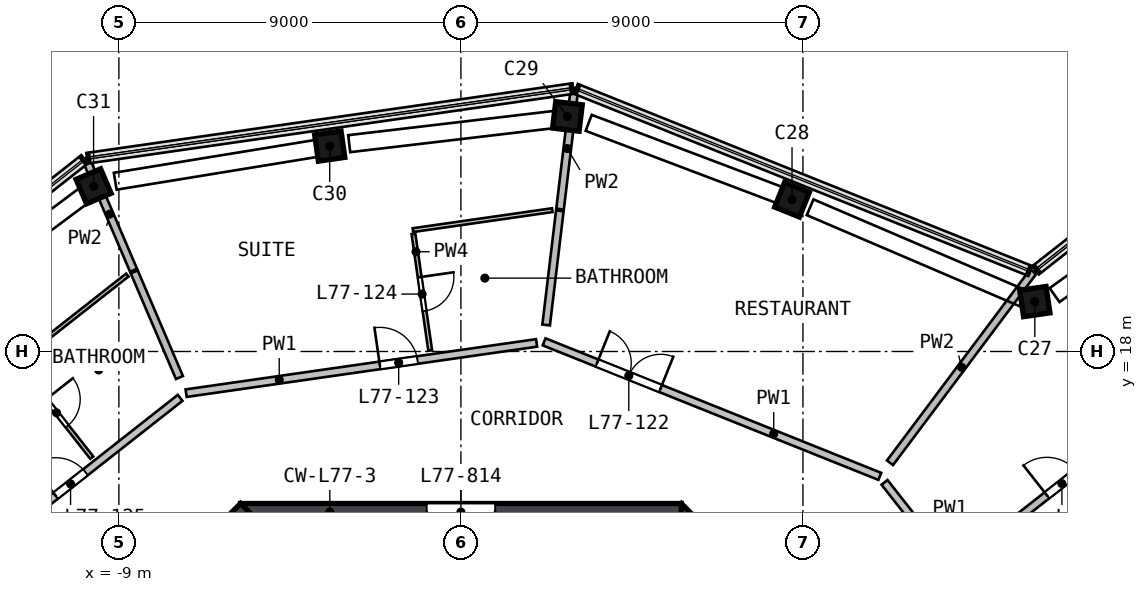
"""IFC4 building model, lengths in metres.
Left out: names, types, materials, properties, quantities, classifications, styles, units other than length and angle.
Written with IfcOpenShell. Run it as: python <this file> out.ifc"""

import sys

from ifc_helpers import new_model, si_unit, direction, frame, frame_2d, origin, origin_2d, place, context, subcontext, project, spatial, rectangle, extrude, element, fill, save


model = new_model("IFC4")
c1 = context("Model", 3, precision=1e-05, world=origin(), true_north=direction((0.0, 1.0)))
c2 = subcontext(c1, "Body", "Model", "MODEL_VIEW")
j1 = project(units=[si_unit("LENGTHUNIT", "METRE"), si_unit("PLANEANGLEUNIT", "RADIAN")], contexts=[c1])
p1 = place(None, origin())
s1 = spatial("IfcSite", under=j1, at=p1, CompositionType="ELEMENT")
p2 = place(p1, origin())
s2 = spatial("IfcBuilding", under=s1, at=p2, CompositionType="ELEMENT")
p3 = place(p2, frame((0.0, 0.0, 310.0)))
s3 = spatial("IfcBuildingStorey", under=s2, at=p3, CompositionType="ELEMENT", Elevation=310.0)
p4 = place(p3, frame((15.179, 19.253, 0.0), z_axis=(-0.064690399, 0.050144316, 0.996644721), x_axis=(0.987816207, 0.14487826, 0.056828077)))
e1 = element("IfcColumn", 1, at=p4, inside=s3, PredefinedType="COLUMN", context=c2, shape_type="SweptSolid", body=[
    extrude(rectangle(XDim=0.7, YDim=0.7, at=origin_2d()), origin(), (0.0, 0.0, 1.0), 4.615),
])
p5 = place(p3, frame((8.801, 21.96, 0.0), z_axis=(-0.07359358, 0.028781386, 0.996872919), x_axis=(-0.925306036, 0.370897286, -0.079018619)))
e2 = element("IfcColumn", 2, at=p5, inside=s3, PredefinedType="COLUMN", context=c2, shape_type="SweptSolid", body=[
    extrude(rectangle(XDim=0.7, YDim=0.7, at=origin_2d()), origin(), (0.0, 0.0, 1.0), 4.615),
])
p6 = place(p3, frame((2.9, 24.175, 0.0), z_axis=(-0.080826804, 0.008992511, 0.996687595), x_axis=(0.989611352, -0.118558007, 0.081322631)))
e3 = element("IfcColumn", 3, at=p6, inside=s3, PredefinedType="COLUMN", context=c2, shape_type="SweptSolid", body=[
    extrude(rectangle(XDim=0.7, YDim=0.7, at=origin_2d()), origin(), (0.0, 0.0, 1.0), 4.615),
])
p7 = place(p3, frame((-3.358, 23.419, 0.0), z_axis=(-0.078143481, -0.011851144, 0.99687168), x_axis=(-0.986826788, -0.141161179, -0.079034246)))
e4 = element("IfcColumn", 4, at=p7, inside=s3, PredefinedType="COLUMN", context=c2, shape_type="SweptSolid", body=[
    extrude(rectangle(XDim=0.7, YDim=0.7, at=origin_2d()), origin(), (0.0, 0.0, 1.0), 4.615),
])
p8 = place(p3, frame((-9.576, 22.386, 0.0), z_axis=(-0.074479333, -0.032584708, 0.996690055), x_axis=(0.916461693, 0.391777358, 0.08129248)))
e5 = element("IfcColumn", 5, at=p8, inside=s3, PredefinedType="COLUMN", context=c2, shape_type="SweptSolid", body=[
    extrude(rectangle(XDim=0.7, YDim=0.7, at=origin_2d()), origin(), (0.0, 0.0, 1.0), 4.615),
])
p9 = place(p3, frame((13.841, 5.64, 0.0), z_axis=(0.0, 0.0, 1.0), x_axis=(-0.707106781, 0.707106781, 0.0)))
e6 = element("IfcWall", 6, at=p9, inside=s3, PredefinedType="SHEAR", context=c2, shape_type="SweptSolid", body=[
    extrude(rectangle(XDim=11.598, YDim=0.45, at=frame_2d((5.799, 0.0))), origin(), (0.0, 0.0, 1.0), 5.0),
])
p10 = place(p9, frame((2.099, 0.0, 0.0)))
e7 = element("IfcOpeningElement", 7, at=p10, cuts=e6, PredefinedType="OPENING", context=c2, shape_type="SweptSolid", body=[
    extrude(rectangle(XDim=1.2, YDim=2.1, at=frame_2d((0.6, 1.05))), frame((0.0, 0.235, 0.0), z_axis=(0.0, -1.0, 0.0), x_axis=(1.0, 0.0, 0.0)), (0.0, 0.0, 1.0), 0.47),
])
p11 = place(p3, frame((5.799, 13.775, 0.0), z_axis=(0.0, 0.0, 1.0), x_axis=(-1.0, 0.0, 0.0)))
e8 = element("IfcWall", 8, at=p11, inside=s3, PredefinedType="SHEAR", context=c2, shape_type="SweptSolid", body=[
    extrude(rectangle(XDim=11.598, YDim=0.45, at=frame_2d((5.799, 0.0))), origin(), (0.0, 0.0, 1.0), 5.0),
])
p12 = place(p11, frame((4.899, 0.0, 0.0)))
e9 = element("IfcOpeningElement", 9, at=p12, cuts=e8, PredefinedType="OPENING", context=c2, shape_type="SweptSolid", body=[
    extrude(rectangle(XDim=1.8, YDim=2.1, at=frame_2d((0.9, 1.05))), frame((0.0, 0.235, 0.0), z_axis=(0.0, -1.0, 0.0), x_axis=(1.0, 0.0, 0.0)), (0.0, 0.0, 1.0), 0.47),
])
p13 = place(p3, frame((-5.64, 13.841, 0.0), z_axis=(0.0, 0.0, 1.0), x_axis=(-0.707106781, -0.707106781, 0.0)))
e10 = element("IfcWall", 10, at=p13, inside=s3, PredefinedType="SHEAR", context=c2, shape_type="SweptSolid", body=[
    extrude(rectangle(XDim=11.598, YDim=0.45, at=frame_2d((5.799, 0.0))), origin(), (0.0, 0.0, 1.0), 5.0),
])
p14 = place(p3, frame((-14.713, 11.023, 0.0), z_axis=(0.0, 0.0, 1.0), x_axis=(0.786284693, 0.617864372, 0.0)))
e11 = element("IfcWall", 11, at=p14, inside=s3, PredefinedType="SOLIDWALL", context=c2, shape_type="SweptSolid", body=[
    extrude(rectangle(XDim=9.316, YDim=0.2, at=frame_2d((4.658, 0.0))), origin(), (0.0, 0.0, 1.0), 4.6),
])
p15 = place(p14, frame((5.15, 0.0, 0.0)))
e12 = element("IfcOpeningElement", 12, at=p15, cuts=e11, PredefinedType="OPENING", context=c2, shape_type="SweptSolid", body=[
    extrude(rectangle(XDim=1.0, YDim=2.1, at=frame_2d((0.5, 1.05))), frame((0.0, 0.11, 0.0), z_axis=(0.0, -1.0, 0.0), x_axis=(1.0, 0.0, 0.0)), (0.0, 0.0, 1.0), 0.22),
])
p16 = place(p3, frame((-7.231, 16.903, 0.0), z_axis=(0.0, 0.0, 1.0), x_axis=(0.989877038, 0.141927623, 0.0)))
e13 = element("IfcWall", 13, at=p16, inside=s3, PredefinedType="SOLIDWALL", context=c2, shape_type="SweptSolid", body=[
    extrude(rectangle(XDim=9.316, YDim=0.2, at=frame_2d((4.658, 0.0))), origin(), (0.0, 0.0, 1.0), 4.6),
])
p17 = place(p16, frame((5.15, 0.0, 0.0)))
e14 = element("IfcOpeningElement", 14, at=p17, cuts=e13, PredefinedType="OPENING", context=c2, shape_type="SweptSolid", body=[
    extrude(rectangle(XDim=1.0, YDim=2.1, at=frame_2d((0.5, 1.05))), frame((0.0, 0.11, 0.0), z_axis=(0.0, -1.0, 0.0), x_axis=(1.0, 0.0, 0.0)), (0.0, 0.0, 1.0), 0.22),
])
p18 = place(p3, frame((2.19, 18.254, 0.0), z_axis=(0.0, 0.0, 1.0), x_axis=(0.928227015, -0.37201426, 0.0)))
e15 = element("IfcWall", 15, at=p18, inside=s3, PredefinedType="SOLIDWALL", context=c2, shape_type="SweptSolid", body=[
    extrude(rectangle(XDim=9.517, YDim=0.2, at=frame_2d((4.758, 0.0))), origin(), (0.0, 0.0, 1.0), 4.6),
])
p19 = place(p18, frame((1.5, 0.0, 0.0)))
e16 = element("IfcOpeningElement", 16, at=p19, cuts=e15, PredefinedType="OPENING", context=c2, shape_type="SweptSolid", body=[
    extrude(rectangle(XDim=1.8, YDim=2.1, at=frame_2d((0.9, 1.05))), frame((0.0, 0.11, 0.0), z_axis=(0.0, -1.0, 0.0), x_axis=(1.0, 0.0, 0.0)), (0.0, 0.0, 1.0), 0.22),
])
p20 = place(p3, frame((11.147, 14.556, 0.0), z_axis=(0.0, 0.0, 1.0), x_axis=(0.617852301, -0.786294178, 0.0)))
e17 = element("IfcWall", 17, at=p20, inside=s3, PredefinedType="SOLIDWALL", context=c2, shape_type="SweptSolid", body=[
    extrude(rectangle(XDim=9.117, YDim=0.2, at=frame_2d((4.558, 0.0))), origin(), (0.0, 0.0, 1.0), 4.6),
])
p21 = place(p20, frame((3.659, 0.0, 0.0)))
e18 = element("IfcOpeningElement", 18, at=p21, cuts=e17, PredefinedType="OPENING", context=c2, shape_type="SweptSolid", body=[
    extrude(rectangle(XDim=1.8, YDim=2.1, at=frame_2d((0.9, 1.05))), frame((0.0, 0.11, 0.0), z_axis=(0.0, -1.0, 0.0), x_axis=(1.0, 0.0, 0.0)), (0.0, 0.0, 1.0), 0.22),
])
p22 = place(p3, frame((-8.614, 20.137, 0.0), z_axis=(0.0, 0.0, 1.0), x_axis=(-0.39326776, 0.919423988, 0.0)))
e19 = element("IfcWall", 19, at=p22, inside=s3, PredefinedType="SOLIDWALL", context=c2, shape_type="SweptSolid", body=[
    extrude(rectangle(XDim=3.211, YDim=0.2, at=frame_2d((1.606, 0.0))), origin(), (0.0, 0.0, 1.0), 4.6),
])
for number, where, z_axis, x_axis in (
    (20, (-7.406, 17.314, 0.0), (0.0, 0.0, 1.0), (-0.393, 0.919, 0.0)),
    (21, (2.243, 18.698, 0.0), (0.0, 0.0, 1.0), (0.119, 0.993, 0.0)),
):
    element("IfcWall", number, at=place(p3, frame(where, z_axis=z_axis, x_axis=x_axis)), inside=s3, PredefinedType="SOLIDWALL", context=c2, shape_type="SweptSolid", body=[
        extrude(rectangle(XDim=3.025, YDim=0.2, at=frame_2d((1.512, 0.0))), origin(), (0.0, 0.0, 1.0), 4.6),
    ])
p23 = place(p3, frame((2.608, 21.747, 0.0), z_axis=(0.0, 0.0, 1.0), x_axis=(0.119130232, 0.992878637, 0.0)))
e22 = element("IfcWall", 22, at=p23, inside=s3, PredefinedType="SOLIDWALL", context=c2, shape_type="SweptSolid", body=[
    extrude(rectangle(XDim=3.211, YDim=0.2, at=frame_2d((1.606, 0.0))), origin(), (0.0, 0.0, 1.0), 4.6),
])
p24 = place(p3, frame((11.291, 15.072, 0.0), z_axis=(0.0, 0.0, 1.0), x_axis=(0.599608195, 0.800293704, 0.0)))
e23 = element("IfcWall", 23, at=p24, inside=s3, PredefinedType="SOLIDWALL", context=c2, shape_type="SweptSolid", body=[
    extrude(rectangle(XDim=6.282, YDim=0.2, at=frame_2d((3.141, 0.0))), origin(), (0.0, 0.0, 1.0), 4.6),
])
p25 = place(p3, frame((13.102, 12.392, 0.0), z_axis=(0.0, 0.0, 1.0), x_axis=(0.786280326, 0.617869929, 0.0)))
e24 = element("IfcWall", 24, at=p25, inside=s3, PredefinedType="SOLIDWALL", context=c2, shape_type="SweptSolid", body=[
    extrude(rectangle(XDim=10.252, YDim=0.2, at=frame_2d((5.126, 0.0))), origin(), (0.0, 0.0, 1.0), 4.6),
])
p26 = place(p25, frame((2.95, 0.0, 0.0)))
e25 = element("IfcOpeningElement", 25, at=p26, cuts=e24, PredefinedType="OPENING", context=c2, shape_type="SweptSolid", body=[
    extrude(rectangle(XDim=1.0, YDim=2.1, at=frame_2d((0.5, 1.05))), frame((0.0, 0.11, 0.0), z_axis=(0.0, -1.0, 0.0), x_axis=(1.0, 0.0, 0.0)), (0.0, 0.0, 1.0), 0.22),
])
p27 = place(p3, frame((23.227, 16.1, 0.0), z_axis=(0.0, 0.0, 1.0), x_axis=(-0.786291895, -0.617855207, 0.0)))
e26 = element("IfcWall", 26, at=p27, inside=s3, PredefinedType="SOLIDWALL", context=c2, shape_type="SweptSolid", body=[
    extrude(rectangle(XDim=10.252, YDim=0.2, at=frame_2d((5.126, 0.0))), origin(), (0.0, 0.0, 1.0), 4.6),
])
p28 = place(p27, frame((2.45, 0.0, 0.0)))
e27 = element("IfcOpeningElement", 27, at=p28, cuts=e26, PredefinedType="OPENING", context=c2, shape_type="SweptSolid", body=[
    extrude(rectangle(XDim=1.0, YDim=2.1, at=frame_2d((0.5, 1.05))), frame((0.0, 0.11, 0.0), z_axis=(0.0, -1.0, 0.0), x_axis=(1.0, 0.0, 0.0)), (0.0, 0.0, 1.0), 0.22),
])
p29 = place(p3, frame((-11.628, 17.644, 0.0), z_axis=(0.0, 0.0, 1.0), x_axis=(0.617842421, -0.786301941, 0.0)))
e28 = element("IfcWall", 28, at=p29, inside=s3, PredefinedType="PARTITIONING", context=c2, shape_type="SweptSolid", body=[
    extrude(rectangle(XDim=3.1, YDim=0.1, at=frame_2d((1.55, 0.0))), origin(), (0.0, 0.0, 1.0), 4.6),
])
p30 = place(p29, frame((1.15, 0.0, 0.0)))
e29 = element("IfcOpeningElement", 29, at=p30, cuts=e28, PredefinedType="OPENING", context=c2, shape_type="SweptSolid", body=[
    extrude(rectangle(XDim=0.9, YDim=2.1, at=frame_2d((0.45, 1.05))), frame((0.0, 0.06, 0.0), z_axis=(0.0, -1.0, 0.0), x_axis=(1.0, 0.0, 0.0)), (0.0, 0.0, 1.0), 0.12),
])
p31 = place(p3, frame((-11.69, 17.723, 0.0), z_axis=(0.0, 0.0, 1.0), x_axis=(0.786279455, 0.617871038, 0.0)))
e30 = element("IfcWall", 30, at=p31, inside=s3, PredefinedType="PARTITIONING", context=c2, shape_type="SweptSolid", body=[
    extrude(rectangle(XDim=3.704, YDim=0.1, at=frame_2d((1.852, 0.0))), origin(), (0.0, 0.0, 1.0), 4.6),
])
p32 = place(p3, frame((-1.248, 21.095, 0.0), z_axis=(0.0, 0.0, 1.0), x_axis=(0.141917498, -0.989878489, 0.0)))
e31 = element("IfcWall", 31, at=p32, inside=s3, PredefinedType="PARTITIONING", context=c2, shape_type="SweptSolid", body=[
    extrude(rectangle(XDim=3.1, YDim=0.1, at=frame_2d((1.55, 0.0))), origin(), (0.0, 0.0, 1.0), 4.6),
])
p33 = place(p32, frame((1.15, 0.0, 0.0)))
e32 = element("IfcOpeningElement", 32, at=p33, cuts=e31, PredefinedType="OPENING", context=c2, shape_type="SweptSolid", body=[
    extrude(rectangle(XDim=0.9, YDim=2.1, at=frame_2d((0.45, 1.05))), frame((0.0, 0.06, 0.0), z_axis=(0.0, -1.0, 0.0), x_axis=(1.0, 0.0, 0.0)), (0.0, 0.0, 1.0), 0.12),
])
p34 = place(p3, frame((-1.263, 21.194, 0.0), z_axis=(0.0, 0.0, 1.0), x_axis=(0.989870244, 0.141974997, 0.0)))
e33 = element("IfcWall", 33, at=p34, inside=s3, PredefinedType="PARTITIONING", context=c2, shape_type="SweptSolid", body=[
    extrude(rectangle(XDim=3.704, YDim=0.1, at=frame_2d((1.852, 0.0))), origin(), (0.0, 0.0, 1.0), 4.6),
])
p35 = place(p12, origin())
e34 = element("IfcDoor", 34, at=p35, inside=s3, OperationType="DOUBLE_DOOR_SINGLE_SWING", PredefinedType="DOOR", context=c2, shape_type="SweptSolid", body=[
    extrude(rectangle(XDim=1.8, YDim=2.1, at=frame_2d((0.9, 1.05))), frame((0.0, 0.025, 0.0), z_axis=(0.0, -1.0, 0.0), x_axis=(1.0, 0.0, 0.0)), (0.0, 0.0, 1.0), 0.05),
])
fill(e9, e34)
p36 = place(p26, origin())
e35 = element("IfcDoor", 35, at=p36, inside=s3, OperationType="SINGLE_SWING_LEFT", PredefinedType="DOOR", context=c2, shape_type="SweptSolid", body=[
    extrude(rectangle(XDim=1.0, YDim=2.1, at=frame_2d((0.5, 1.05))), frame((0.0, 0.025, 0.0), z_axis=(0.0, -1.0, 0.0), x_axis=(1.0, 0.0, 0.0)), (0.0, 0.0, 1.0), 0.05),
])
fill(e25, e35)
p37 = place(p19, origin())
e36 = element("IfcDoor", 36, at=p37, inside=s3, OperationType="DOUBLE_DOOR_SINGLE_SWING", PredefinedType="DOOR", context=c2, shape_type="SweptSolid", body=[
    extrude(rectangle(XDim=1.8, YDim=2.1, at=frame_2d((0.9, 1.05))), frame((0.0, 0.025, 0.0), z_axis=(0.0, -1.0, 0.0), x_axis=(1.0, 0.0, 0.0)), (0.0, 0.0, 1.0), 0.05),
])
fill(e16, e36)
p38 = place(p17, origin())
e37 = element("IfcDoor", 37, at=p38, inside=s3, OperationType="SINGLE_SWING_LEFT", PredefinedType="DOOR", context=c2, shape_type="SweptSolid", body=[
    extrude(rectangle(XDim=1.0, YDim=2.1, at=frame_2d((0.5, 1.05))), frame((0.0, 0.025, 0.0), z_axis=(0.0, -1.0, 0.0), x_axis=(1.0, 0.0, 0.0)), (0.0, 0.0, 1.0), 0.05),
])
fill(e14, e37)
p39 = place(p33, origin())
e38 = element("IfcDoor", 38, at=p39, inside=s3, OperationType="SINGLE_SWING_LEFT", PredefinedType="DOOR", context=c2, shape_type="SweptSolid", body=[
    extrude(rectangle(XDim=0.9, YDim=2.1, at=frame_2d((0.45, 1.05))), frame((0.0, 0.025, 0.0), z_axis=(0.0, -1.0, 0.0), x_axis=(1.0, 0.0, 0.0)), (0.0, 0.0, 1.0), 0.05),
])
fill(e32, e38)
p40 = place(p15, origin())
e39 = element("IfcDoor", 39, at=p40, inside=s3, OperationType="SINGLE_SWING_LEFT", PredefinedType="DOOR", context=c2, shape_type="SweptSolid", body=[
    extrude(rectangle(XDim=1.0, YDim=2.1, at=frame_2d((0.5, 1.05))), frame((0.0, 0.025, 0.0), z_axis=(0.0, -1.0, 0.0), x_axis=(1.0, 0.0, 0.0)), (0.0, 0.0, 1.0), 0.05),
])
fill(e12, e39)
p41 = place(p30, origin())
e40 = element("IfcDoor", 40, at=p41, inside=s3, OperationType="SINGLE_SWING_LEFT", PredefinedType="DOOR", context=c2, shape_type="SweptSolid", body=[
    extrude(rectangle(XDim=0.9, YDim=2.1, at=frame_2d((0.45, 1.05))), frame((0.0, 0.025, 0.0), z_axis=(0.0, -1.0, 0.0), x_axis=(1.0, 0.0, 0.0)), (0.0, 0.0, 1.0), 0.05),
])
fill(e29, e40)
save(model, sys.argv[1])
